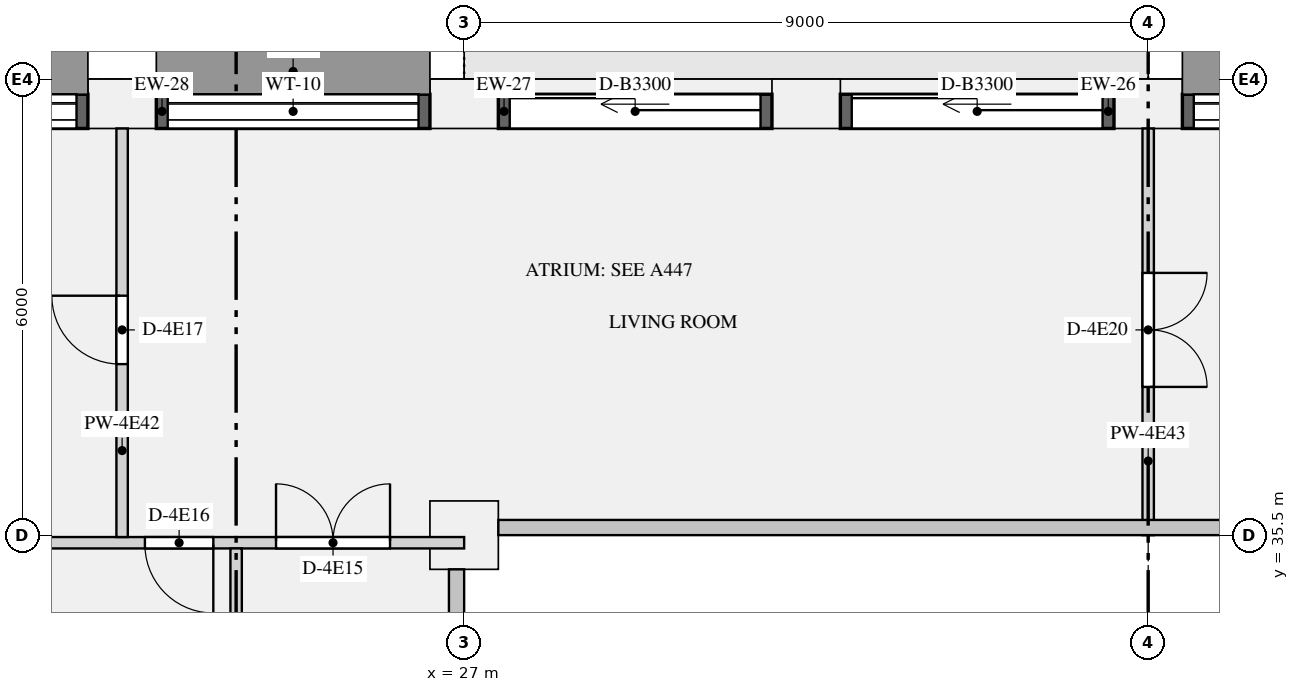
"""IFC4 building model, lengths in metres.
Left out: names, types, materials, properties, quantities, classifications, styles, units other than length and angle.
Written with IfcOpenShell. Run it as: python <this file> out.ifc"""

import sys

from ifc_helpers import new_model, si_unit, direction, frame, frame_2d, origin, origin_2d, place, context, subcontext, project, spatial, rectangle, extrude, element, fill, save


model = new_model("IFC4")
c1 = context("Model", 3, precision=1e-05, world=origin(), true_north=direction((0.0, 1.0)))
c2 = subcontext(c1, "Body", "Model", "MODEL_VIEW")
j1 = project(units=[si_unit("LENGTHUNIT", "METRE"), si_unit("PLANEANGLEUNIT", "RADIAN")], contexts=[c1])
p1 = place(None, origin())
s1 = spatial("IfcSite", under=j1, at=p1, CompositionType="ELEMENT")
p2 = place(p1, origin())
s2 = spatial("IfcBuilding", under=s1, at=p2, CompositionType="ELEMENT")
p3 = place(p2, frame((0.0, 0.0, 229.5)))
s3 = spatial("IfcBuildingStorey", under=s2, at=p3, CompositionType="ELEMENT", Elevation=229.5)
for number, where, z_axis, x_axis in (
    (1, (36.0, 41.175, 0.0), (0.0, 0.0, 1.0), (-1.0, 0.0, 0.0)),
    (2, (31.5, 41.175, 0.0), (0.0, 0.0, 1.0), (-1.0, 0.0, 0.0)),
    (3, (27.0, 41.175, 0.0), (0.0, 0.0, 1.0), (-1.0, 0.0, 0.0)),
    (4, (22.5, 41.175, 0.0), (0.0, 0.0, 1.0), (-1.0, 0.0, 0.0)),
):
    element("IfcColumn", number, at=place(p3, frame(where, z_axis=z_axis, x_axis=x_axis)), inside=s3, PredefinedType="USERDEFINED", context=c2, shape_type="SweptSolid", body=[
        extrude(rectangle(XDim=0.9, YDim=0.65, at=origin_2d()), origin(), (0.0, 0.0, 1.0), 3.15),
    ])
p4 = place(p3, frame((27.0, 35.5, 0.0), z_axis=(0.0, 0.0, 1.0), x_axis=(1.0, 0.0, 0.0)))
e5 = element("IfcColumn", 5, at=p4, inside=s3, PredefinedType="COLUMN", context=c2, shape_type="SweptSolid", body=[
    extrude(rectangle(XDim=0.9, YDim=0.9, at=origin_2d()), origin(), (0.0, 0.0, 1.0), 3.15),
])
p5 = place(p3, frame((40.05, 41.075, 0.9), z_axis=(0.0, 0.0, 1.0), x_axis=(-1.0, 0.0, 0.0)))
e6 = element("IfcWall", 6, at=p5, inside=s3, PredefinedType="SOLIDWALL", context=c2, shape_type="SweptSolid", body=[
    extrude(rectangle(XDim=3.6, YDim=0.45, at=frame_2d((1.8, 0.0))), origin(), (0.0, 0.0, 1.0), 1.93),
])
p6 = place(p5, frame((0.15, 0.0, 0.15)))
e7 = element("IfcOpeningElement", 7, at=p6, cuts=e6, PredefinedType="OPENING", context=c2, shape_type="SweptSolid", body=[
    extrude(rectangle(XDim=3.3, YDim=1.5, at=frame_2d((1.65, 0.75))), frame((0.0, 0.235, 0.0), z_axis=(0.0, -1.0, 0.0), x_axis=(1.0, 0.0, 0.0)), (0.0, 0.0, 1.0), 0.47),
])
p7 = place(p3, frame((35.55, 41.075, 0.0), z_axis=(0.0, 0.0, 1.0), x_axis=(-1.0, 0.0, 0.0)))
e8 = element("IfcWall", 8, at=p7, inside=s3, PredefinedType="SOLIDWALL", context=c2, shape_type="SweptSolid", body=[
    extrude(rectangle(XDim=3.6, YDim=0.45, at=frame_2d((1.8, 0.0))), origin(), (0.0, 0.0, 1.0), 2.83),
])
p8 = place(p7, frame((0.15, 0.0, 0.0)))
e9 = element("IfcOpeningElement", 9, at=p8, cuts=e8, PredefinedType="OPENING", context=c2, shape_type="SweptSolid", body=[
    extrude(rectangle(XDim=3.3, YDim=2.3, at=frame_2d((1.65, 1.15))), frame((0.0, 0.235, 0.0), z_axis=(0.0, -1.0, 0.0), x_axis=(1.0, 0.0, 0.0)), (0.0, 0.0, 1.0), 0.47),
])
p9 = place(p3, frame((31.05, 41.075, 0.0), z_axis=(0.0, 0.0, 1.0), x_axis=(-1.0, 0.0, 0.0)))
e10 = element("IfcWall", 10, at=p9, inside=s3, PredefinedType="SOLIDWALL", context=c2, shape_type="SweptSolid", body=[
    extrude(rectangle(XDim=3.6, YDim=0.45, at=frame_2d((1.8, 0.0))), origin(), (0.0, 0.0, 1.0), 2.83),
])
p10 = place(p9, frame((0.15, 0.0, 0.0)))
e11 = element("IfcOpeningElement", 11, at=p10, cuts=e10, PredefinedType="OPENING", context=c2, shape_type="SweptSolid", body=[
    extrude(rectangle(XDim=3.3, YDim=2.3, at=frame_2d((1.65, 1.15))), frame((0.0, 0.235, 0.0), z_axis=(0.0, -1.0, 0.0), x_axis=(1.0, 0.0, 0.0)), (0.0, 0.0, 1.0), 0.47),
])
p11 = place(p3, frame((26.55, 41.075, 0.9), z_axis=(0.0, 0.0, 1.0), x_axis=(-1.0, 0.0, 0.0)))
e12 = element("IfcWall", 12, at=p11, inside=s3, PredefinedType="SOLIDWALL", context=c2, shape_type="SweptSolid", body=[
    extrude(rectangle(XDim=3.6, YDim=0.45, at=frame_2d((1.8, 0.0))), origin(), (0.0, 0.0, 1.0), 1.93),
])
p12 = place(p11, frame((0.15, 0.0, 0.15)))
e13 = element("IfcOpeningElement", 13, at=p12, cuts=e12, PredefinedType="OPENING", context=c2, shape_type="SweptSolid", body=[
    extrude(rectangle(XDim=3.3, YDim=1.5, at=frame_2d((1.65, 0.75))), frame((0.0, 0.235, 0.0), z_axis=(0.0, -1.0, 0.0), x_axis=(1.0, 0.0, 0.0)), (0.0, 0.0, 1.0), 0.47),
])
p13 = place(p3, frame((22.05, 41.075, 0.9), z_axis=(0.0, 0.0, 1.0), x_axis=(-1.0, 0.0, 0.0)))
e14 = element("IfcWall", 14, at=p13, inside=s3, PredefinedType="SOLIDWALL", context=c2, shape_type="SweptSolid", body=[
    extrude(rectangle(XDim=3.6, YDim=0.45, at=frame_2d((1.8, 0.0))), origin(), (0.0, 0.0, 1.0), 1.93),
])
p14 = place(p13, frame((0.15, 0.0, 0.15)))
e15 = element("IfcOpeningElement", 15, at=p14, cuts=e14, PredefinedType="OPENING", context=c2, shape_type="SweptSolid", body=[
    extrude(rectangle(XDim=3.3, YDim=1.5, at=frame_2d((1.65, 0.75))), frame((0.0, 0.235, 0.0), z_axis=(0.0, -1.0, 0.0), x_axis=(1.0, 0.0, 0.0)), (0.0, 0.0, 1.0), 0.47),
])
p15 = place(p3, frame((15.8, 35.4, 0.0), z_axis=(0.0, 0.0, 1.0), x_axis=(1.0, 0.0, 0.0)))
e16 = element("IfcWall", 16, at=p15, inside=s3, PredefinedType="PARTITIONING", context=c2, shape_type="SweptSolid", body=[
    extrude(rectangle(XDim=11.2, YDim=0.15, at=frame_2d((5.6, 0.0))), origin(), (0.0, 0.0, 1.0), 2.83),
])
p16 = place(p15, frame((8.725, 0.0, 0.0)))
e17 = element("IfcOpeningElement", 17, at=p16, cuts=e16, PredefinedType="OPENING", context=c2, shape_type="SweptSolid", body=[
    extrude(rectangle(XDim=1.5, YDim=2.1, at=frame_2d((0.75, 1.05))), frame((0.0, 0.085, 0.0), z_axis=(0.0, -1.0, 0.0), x_axis=(1.0, 0.0, 0.0)), (0.0, 0.0, 1.0), 0.17),
])
p17 = place(p15, frame((7.0, 0.0, 0.0)))
e18 = element("IfcOpeningElement", 18, at=p17, cuts=e16, PredefinedType="OPENING", context=c2, shape_type="SweptSolid", body=[
    extrude(rectangle(XDim=0.9, YDim=2.1, at=frame_2d((0.45, 1.05))), frame((0.0, 0.085, 0.0), z_axis=(0.0, -1.0, 0.0), x_axis=(1.0, 0.0, 0.0)), (0.0, 0.0, 1.0), 0.17),
])
p18 = place(p15, frame((3.225, 0.0, 0.0)))
e19 = element("IfcOpeningElement", 19, at=p18, cuts=e16, PredefinedType="OPENING", context=c2, shape_type="SweptSolid", body=[
    extrude(rectangle(XDim=0.9, YDim=2.1, at=frame_2d((0.45, 1.05))), frame((0.0, 0.085, 0.0), z_axis=(0.0, -1.0, 0.0), x_axis=(1.0, 0.0, 0.0)), (0.0, 0.0, 1.0), 0.17),
])
p19 = place(p3, frame((24.0, 27.1, 0.0), z_axis=(0.0, 0.0, 1.0), x_axis=(0.0, 1.0, 0.0)))
e20 = element("IfcWall", 20, at=p19, inside=s3, PredefinedType="PARTITIONING", context=c2, shape_type="SweptSolid", body=[
    extrude(rectangle(XDim=8.225, YDim=0.15, at=frame_2d((4.112, 0.0))), origin(), (0.0, 0.0, 1.0), 2.83),
])
p20 = place(p19, frame((0.95, 0.0, 0.0)))
e21 = element("IfcOpeningElement", 21, at=p20, cuts=e20, PredefinedType="OPENING", context=c2, shape_type="SweptSolid", body=[
    extrude(rectangle(XDim=0.9, YDim=2.1, at=frame_2d((0.45, 1.05))), frame((0.0, 0.085, 0.0), z_axis=(0.0, -1.0, 0.0), x_axis=(1.0, 0.0, 0.0)), (0.0, 0.0, 1.0), 0.17),
])
p21 = place(p3, frame((22.5, 35.475, 0.0), z_axis=(0.0, 0.0, 1.0), x_axis=(0.0, 1.0, 0.0)))
e22 = element("IfcWall", 22, at=p21, inside=s3, PredefinedType="PARTITIONING", context=c2, shape_type="SweptSolid", body=[
    extrude(rectangle(XDim=5.375, YDim=0.15, at=frame_2d((2.688, 0.0))), origin(), (0.0, 0.0, 1.0), 2.83),
])
p22 = place(p21, frame((2.275, 0.0, 0.0)))
e23 = element("IfcOpeningElement", 23, at=p22, cuts=e22, PredefinedType="OPENING", context=c2, shape_type="SweptSolid", body=[
    extrude(rectangle(XDim=0.9, YDim=2.1, at=frame_2d((0.45, 1.05))), frame((0.0, 0.085, 0.0), z_axis=(0.0, -1.0, 0.0), x_axis=(1.0, 0.0, 0.0)), (0.0, 0.0, 1.0), 0.17),
])
p23 = place(p3, frame((36.0, 35.5, 0.0), z_axis=(0.0, 0.0, 1.0), x_axis=(0.0, 1.0, 0.0)))
e24 = element("IfcWall", 24, at=p23, inside=s3, PredefinedType="PARTITIONING", context=c2, shape_type="SweptSolid", body=[
    extrude(rectangle(XDim=5.35, YDim=0.15, at=frame_2d((2.675, 0.0))), origin(), (0.0, 0.0, 1.0), 2.83),
])
p24 = place(p23, frame((1.95, 0.0, 0.0)))
e25 = element("IfcOpeningElement", 25, at=p24, cuts=e24, PredefinedType="OPENING", context=c2, shape_type="SweptSolid", body=[
    extrude(rectangle(XDim=1.5, YDim=2.1, at=frame_2d((0.75, 1.05))), frame((0.0, 0.085, 0.0), z_axis=(0.0, -1.0, 0.0), x_axis=(1.0, 0.0, 0.0)), (0.0, 0.0, 1.0), 0.17),
])
p25 = place(p6, origin())
e26 = element("IfcWindow", 26, at=p25, inside=s3, PartitioningType="SINGLE_PANEL", PredefinedType="WINDOW", context=c2, shape_type="SweptSolid", body=[
    extrude(rectangle(XDim=3.3, YDim=1.5, at=frame_2d((1.65, 0.75))), frame((0.0, -0.065, 0.0), z_axis=(0.0, -1.0, 0.0), x_axis=(1.0, 0.0, 0.0)), (0.0, 0.0, 1.0), 0.06),
])
fill(e7, e26)
p26 = place(p8, origin())
e27 = element("IfcDoor", 27, at=p26, inside=s3, OperationType="SLIDING_TO_LEFT", PredefinedType="DOOR", context=c2, shape_type="SweptSolid", body=[
    extrude(rectangle(XDim=3.3, YDim=2.3, at=frame_2d((1.65, 1.15))), frame((0.0, -0.07, 0.0), z_axis=(0.0, -1.0, 0.0), x_axis=(1.0, 0.0, 0.0)), (0.0, 0.0, 1.0), 0.05),
])
fill(e9, e27)
p27 = place(p10, origin())
e28 = element("IfcDoor", 28, at=p27, inside=s3, OperationType="SLIDING_TO_LEFT", PredefinedType="DOOR", context=c2, shape_type="SweptSolid", body=[
    extrude(rectangle(XDim=3.3, YDim=2.3, at=frame_2d((1.65, 1.15))), frame((0.0, -0.07, 0.0), z_axis=(0.0, -1.0, 0.0), x_axis=(1.0, 0.0, 0.0)), (0.0, 0.0, 1.0), 0.05),
])
fill(e11, e28)
p28 = place(p12, origin())
e29 = element("IfcWindow", 29, at=p28, inside=s3, PartitioningType="SINGLE_PANEL", PredefinedType="WINDOW", context=c2, shape_type="SweptSolid", body=[
    extrude(rectangle(XDim=3.3, YDim=1.5, at=frame_2d((1.65, 0.75))), frame((0.0, -0.065, 0.0), z_axis=(0.0, -1.0, 0.0), x_axis=(1.0, 0.0, 0.0)), (0.0, 0.0, 1.0), 0.06),
])
fill(e13, e29)
p29 = place(p14, origin())
e30 = element("IfcWindow", 30, at=p29, inside=s3, PartitioningType="SINGLE_PANEL", PredefinedType="WINDOW", context=c2, shape_type="SweptSolid", body=[
    extrude(rectangle(XDim=3.3, YDim=1.5, at=frame_2d((1.65, 0.75))), frame((0.0, -0.065, 0.0), z_axis=(0.0, -1.0, 0.0), x_axis=(1.0, 0.0, 0.0)), (0.0, 0.0, 1.0), 0.06),
])
fill(e15, e30)
p30 = place(p16, origin())
e31 = element("IfcDoor", 31, at=p30, inside=s3, OperationType="DOUBLE_DOOR_SINGLE_SWING", PredefinedType="DOOR", context=c2, shape_type="SweptSolid", body=[
    extrude(rectangle(XDim=1.5, YDim=2.1, at=frame_2d((0.75, 1.05))), frame((0.0, 0.025, 0.0), z_axis=(0.0, -1.0, 0.0), x_axis=(1.0, 0.0, 0.0)), (0.0, 0.0, 1.0), 0.05),
])
fill(e17, e31)
p31 = place(p17, frame((0.9, 0.0, 0.0), z_axis=(0.0, 0.0, 1.0), x_axis=(-1.0, 0.0, 0.0)))
e32 = element("IfcDoor", 32, at=p31, inside=s3, OperationType="SINGLE_SWING_LEFT", PredefinedType="DOOR", context=c2, shape_type="SweptSolid", body=[
    extrude(rectangle(XDim=0.9, YDim=2.1, at=frame_2d((0.45, 1.05))), frame((0.0, 0.025, 0.0), z_axis=(0.0, -1.0, 0.0), x_axis=(1.0, 0.0, 0.0)), (0.0, 0.0, 1.0), 0.05),
])
fill(e18, e32)
p32 = place(p22, origin())
e33 = element("IfcDoor", 33, at=p32, inside=s3, OperationType="SINGLE_SWING_RIGHT", PredefinedType="DOOR", context=c2, shape_type="SweptSolid", body=[
    extrude(rectangle(XDim=0.9, YDim=2.1, at=frame_2d((0.45, 1.05))), frame((0.0, 0.025, 0.0), z_axis=(0.0, -1.0, 0.0), x_axis=(1.0, 0.0, 0.0)), (0.0, 0.0, 1.0), 0.05),
])
fill(e23, e33)
p33 = place(p24, frame((1.5, 0.0, 0.0), z_axis=(0.0, 0.0, 1.0), x_axis=(-1.0, 0.0, 0.0)))
e34 = element("IfcDoor", 34, at=p33, inside=s3, OperationType="DOUBLE_DOOR_SINGLE_SWING", PredefinedType="DOOR", context=c2, shape_type="SweptSolid", body=[
    extrude(rectangle(XDim=1.5, YDim=2.1, at=frame_2d((0.75, 1.05))), frame((0.0, 0.025, 0.0), z_axis=(0.0, -1.0, 0.0), x_axis=(1.0, 0.0, 0.0)), (0.0, 0.0, 1.0), 0.05),
])
fill(e25, e34)
save(model, sys.argv[1])
